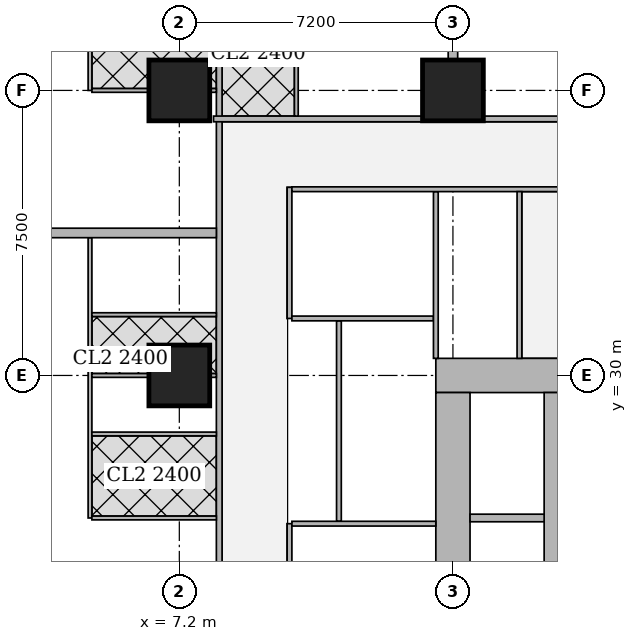
"""IFC4 building model, lengths in metres.
Left out: names, types, materials, properties, quantities, classifications, styles, units other than length and angle.
Written with IfcOpenShell. Run it as: python <this file> out.ifc"""

import sys

from ifc_helpers import new_model, si_unit, direction, frame, frame_2d, origin, origin_2d, place, context, subcontext, project, spatial, rectangle, extrude, element, fill, save


model = new_model("IFC4")
c1 = context("Model", 3, precision=1e-05, world=origin(), true_north=direction((0.0, 1.0)))
c2 = subcontext(c1, "Body", "Model", "MODEL_VIEW")
j1 = project(units=[si_unit("LENGTHUNIT", "METRE"), si_unit("PLANEANGLEUNIT", "RADIAN")], contexts=[c1])
p1 = place(None, origin())
s1 = spatial("IfcSite", under=j1, at=p1, CompositionType="ELEMENT")
p2 = place(p1, origin())
s2 = spatial("IfcBuilding", under=s1, at=p2, CompositionType="ELEMENT")
p3 = place(p2, frame((0.0, 0.0, 81.65)))
s3 = spatial("IfcBuildingStorey", under=s2, at=p3, CompositionType="ELEMENT", Elevation=81.65)
for number, where, z_axis, x_axis in (
    (1, (7.2, 30.0, 0.0), (0.0, 0.0, 1.0), (1.0, 0.0, 0.0)),
    (2, (7.2, 37.5, 0.0), (0.0, 0.0, 1.0), (1.0, 0.0, 0.0)),
    (3, (14.4, 37.5, 0.0), (0.0, 0.0, 1.0), (1.0, 0.0, 0.0)),
):
    element("IfcColumn", number, at=place(p3, frame(where, z_axis=z_axis, x_axis=x_axis)), inside=s3, PredefinedType="COLUMN", context=c2, shape_type="SweptSolid", body=[
        extrude(rectangle(XDim=1.6, YDim=1.6, at=origin_2d()), origin(), (0.0, 0.0, 1.0), 3.75),
    ])
p4 = place(p3, frame((13.95, 30.0, 0.0), z_axis=(0.0, 0.0, 1.0), x_axis=(1.0, 0.0, 0.0)))
e4 = element("IfcWall", 4, at=p4, inside=s3, PredefinedType="SHEAR", context=c2, shape_type="SweptSolid", body=[
    extrude(rectangle(XDim=15.3, YDim=0.9, at=frame_2d((7.65, 0.0))), origin(), (0.0, 0.0, 1.0), 3.75),
])
p5 = place(p4, frame((4.45, 0.0, 0.0)))
e5 = element("IfcOpeningElement", 5, at=p5, cuts=e4, PredefinedType="OPENING", context=c2, shape_type="SweptSolid", body=[
    extrude(rectangle(XDim=1.8, YDim=2.1, at=frame_2d((0.9, 1.05))), frame((0.0, 0.46, 0.0), z_axis=(0.0, -1.0, 0.0), x_axis=(1.0, 0.0, 0.0)), (0.0, 0.0, 1.0), 0.92),
])
p6 = place(p4, frame((10.7, 0.0, 0.0)))
e6 = element("IfcOpeningElement", 6, at=p6, cuts=e4, PredefinedType="OPENING", context=c2, shape_type="SweptSolid", body=[
    extrude(rectangle(XDim=1.1, YDim=2.1, at=frame_2d((0.55, 1.05))), frame((0.0, 0.46, 0.0), z_axis=(0.0, -1.0, 0.0), x_axis=(1.0, 0.0, 0.0)), (0.0, 0.0, 1.0), 0.92),
])
p7 = place(p3, frame((14.4, 15.45, 0.0), z_axis=(0.0, 0.0, 1.0), x_axis=(0.0, 1.0, 0.0)))
e7 = element("IfcWall", 7, at=p7, inside=s3, PredefinedType="SHEAR", context=c2, shape_type="SweptSolid", body=[
    extrude(rectangle(XDim=14.1, YDim=0.9, at=frame_2d((7.05, 0.0))), origin(), (0.0, 0.0, 1.0), 3.75),
])
p8 = place(p3, frame((17.0, 15.45, 0.0), z_axis=(0.0, 0.0, 1.0), x_axis=(0.0, 1.0, 0.0)))
e8 = element("IfcWall", 8, at=p8, inside=s3, PredefinedType="SHEAR", context=c2, shape_type="SweptSolid", body=[
    extrude(rectangle(XDim=14.1, YDim=0.4, at=frame_2d((7.05, 0.0))), origin(), (0.0, 0.0, 1.0), 3.75),
])
p9 = place(p8, frame((0.875, 0.0, 0.0)))
e9 = element("IfcOpeningElement", 9, at=p9, cuts=e8, PredefinedType="OPENING", context=c2, shape_type="SweptSolid", body=[
    extrude(rectangle(XDim=1.1, YDim=2.1, at=frame_2d((0.55, 1.05))), frame((0.0, 0.21, 0.0), z_axis=(0.0, -1.0, 0.0), x_axis=(1.0, 0.0, 0.0)), (0.0, 0.0, 1.0), 0.42),
])
p10 = place(p8, frame((4.625, 0.0, 0.0)))
e10 = element("IfcOpeningElement", 10, at=p10, cuts=e8, PredefinedType="OPENING", context=c2, shape_type="SweptSolid", body=[
    extrude(rectangle(XDim=1.1, YDim=2.1, at=frame_2d((0.55, 1.05))), frame((0.0, 0.21, 0.0), z_axis=(0.0, -1.0, 0.0), x_axis=(1.0, 0.0, 0.0)), (0.0, 0.0, 1.0), 0.42),
])
p11 = place(p8, frame((8.375, 0.0, 0.0)))
e11 = element("IfcOpeningElement", 11, at=p11, cuts=e8, PredefinedType="OPENING", context=c2, shape_type="SweptSolid", body=[
    extrude(rectangle(XDim=1.1, YDim=2.1, at=frame_2d((0.55, 1.05))), frame((0.0, 0.21, 0.0), z_axis=(0.0, -1.0, 0.0), x_axis=(1.0, 0.0, 0.0)), (0.0, 0.0, 1.0), 0.42),
])
p12 = place(p8, frame((12.125, 0.0, 0.0)))
e12 = element("IfcOpeningElement", 12, at=p12, cuts=e8, PredefinedType="OPENING", context=c2, shape_type="SweptSolid", body=[
    extrude(rectangle(XDim=1.1, YDim=2.1, at=frame_2d((0.55, 1.05))), frame((0.0, 0.21, 0.0), z_axis=(0.0, -1.0, 0.0), x_axis=(1.0, 0.0, 0.0)), (0.0, 0.0, 1.0), 0.42),
])
p13 = place(p3, frame((8.25, 2.126, 0.0), z_axis=(0.0, 0.0, 1.0), x_axis=(0.0, 1.0, 0.0)))
e13 = element("IfcWall", 13, at=p13, inside=s3, PredefinedType="SOLIDWALL", context=c2, shape_type="SweptSolid", body=[
    extrude(rectangle(XDim=40.773, YDim=0.15, at=frame_2d((20.386, 0.0))), origin(), (0.0, 0.0, 1.0), 3.5),
])
p14 = place(p13, frame((17.787, 0.0, 0.0)))
e14 = element("IfcOpeningElement", 14, at=p14, cuts=e13, PredefinedType="OPENING", context=c2, shape_type="SweptSolid", body=[
    extrude(rectangle(XDim=1.0, YDim=2.1, at=frame_2d((0.5, 1.05))), frame((0.0, 0.085, 0.0), z_axis=(0.0, -1.0, 0.0), x_axis=(1.0, 0.0, 0.0)), (0.0, 0.0, 1.0), 0.17),
])
p15 = place(p13, frame((21.962, 0.0, 0.0)))
e15 = element("IfcOpeningElement", 15, at=p15, cuts=e13, PredefinedType="OPENING", context=c2, shape_type="SweptSolid", body=[
    extrude(rectangle(XDim=1.0, YDim=2.1, at=frame_2d((0.5, 1.05))), frame((0.0, 0.085, 0.0), z_axis=(0.0, -1.0, 0.0), x_axis=(1.0, 0.0, 0.0)), (0.0, 0.0, 1.0), 0.17),
])
p16 = place(p13, frame((32.787, 0.0, 0.0)))
e16 = element("IfcOpeningElement", 16, at=p16, cuts=e13, PredefinedType="OPENING", context=c2, shape_type="SweptSolid", body=[
    extrude(rectangle(XDim=1.0, YDim=2.1, at=frame_2d((0.5, 1.05))), frame((0.0, 0.085, 0.0), z_axis=(0.0, -1.0, 0.0), x_axis=(1.0, 0.0, 0.0)), (0.0, 0.0, 1.0), 0.17),
])
p17 = place(p3, frame((8.1, 36.75, 0.0), z_axis=(0.0, 0.0, 1.0), x_axis=(1.0, 0.0, 0.0)))
e17 = element("IfcWall", 17, at=p17, inside=s3, PredefinedType="SOLIDWALL", context=c2, shape_type="SweptSolid", body=[
    extrude(rectangle(XDim=5.499, YDim=0.15, at=frame_2d((2.75, 0.0))), origin(), (0.0, 0.0, 1.0), 3.5),
])
p18 = place(p17, frame((3.739, 0.0, 0.0)))
e18 = element("IfcOpeningElement", 18, at=p18, cuts=e17, PredefinedType="OPENING", context=c2, shape_type="SweptSolid", body=[
    extrude(rectangle(XDim=1.0, YDim=2.1, at=frame_2d((0.5, 1.05))), frame((0.0, 0.085, 0.0), z_axis=(0.0, -1.0, 0.0), x_axis=(1.0, 0.0, 0.0)), (0.0, 0.0, 1.0), 0.17),
])
p19 = place(p3, frame((15.201, 36.75, 0.0), z_axis=(0.0, 0.0, 1.0), x_axis=(1.0, 0.0, 0.0)))
e19 = element("IfcWall", 19, at=p19, inside=s3, PredefinedType="SOLIDWALL", context=c2, shape_type="SweptSolid", body=[
    extrude(rectangle(XDim=5.598, YDim=0.15, at=frame_2d((2.799, 0.0))), origin(), (0.0, 0.0, 1.0), 3.5),
])
p20 = place(p19, frame((0.699, 0.0, 0.0)))
e20 = element("IfcOpeningElement", 20, at=p20, cuts=e19, PredefinedType="OPENING", context=c2, shape_type="SweptSolid", body=[
    extrude(rectangle(XDim=1.0, YDim=2.1, at=frame_2d((0.5, 1.05))), frame((0.0, 0.085, 0.0), z_axis=(0.0, -1.0, 0.0), x_axis=(1.0, 0.0, 0.0)), (0.0, 0.0, 1.0), 0.17),
])
p21 = place(p3, frame((4.85, 26.25, 0.0), z_axis=(0.0, 0.0, 1.0), x_axis=(0.0, 1.0, 0.0)))
e21 = element("IfcWall", 21, at=p21, inside=s3, PredefinedType="PARTITIONING", context=c2, shape_type="SweptSolid", body=[
    extrude(rectangle(XDim=7.375, YDim=0.1, at=frame_2d((3.688, 0.0))), origin(), (0.0, 0.0, 1.0), 3.5),
])
p22 = place(p21, frame((0.655, 0.0, 0.0)))
e22 = element("IfcOpeningElement", 22, at=p22, cuts=e21, PredefinedType="OPENING", context=c2, shape_type="SweptSolid", body=[
    extrude(rectangle(XDim=0.9, YDim=2.1, at=frame_2d((0.45, 1.05))), frame((0.0, 0.06, 0.0), z_axis=(0.0, -1.0, 0.0), x_axis=(1.0, 0.0, 0.0)), (0.0, 0.0, 1.0), 0.12),
])
p23 = place(p21, frame((4.1, 0.0, 0.0)))
e23 = element("IfcOpeningElement", 23, at=p23, cuts=e21, PredefinedType="OPENING", context=c2, shape_type="SweptSolid", body=[
    extrude(rectangle(XDim=0.9, YDim=2.1, at=frame_2d((0.45, 1.05))), frame((0.0, 0.06, 0.0), z_axis=(0.0, -1.0, 0.0), x_axis=(1.0, 0.0, 0.0)), (0.0, 0.0, 1.0), 0.12),
])
p24 = place(p21, frame((2.53, 0.0, 0.0)))
e24 = element("IfcOpeningElement", 24, at=p24, cuts=e21, PredefinedType="OPENING", context=c2, shape_type="SweptSolid", body=[
    extrude(rectangle(XDim=0.9, YDim=2.1, at=frame_2d((0.45, 1.05))), frame((0.0, 0.06, 0.0), z_axis=(0.0, -1.0, 0.0), x_axis=(1.0, 0.0, 0.0)), (0.0, 0.0, 1.0), 0.12),
])
p25 = place(p21, frame((5.975, 0.0, 0.0)))
e25 = element("IfcOpeningElement", 25, at=p25, cuts=e21, PredefinedType="OPENING", context=c2, shape_type="SweptSolid", body=[
    extrude(rectangle(XDim=0.9, YDim=2.1, at=frame_2d((0.45, 1.05))), frame((0.0, 0.06, 0.0), z_axis=(0.0, -1.0, 0.0), x_axis=(1.0, 0.0, 0.0)), (0.0, 0.0, 1.0), 0.12),
])
p26 = place(p3, frame((4.9, 26.25, 0.0), z_axis=(0.0, 0.0, 1.0), x_axis=(1.0, 0.0, 0.0)))
e26 = element("IfcWall", 26, at=p26, inside=s3, PredefinedType="PARTITIONING", context=c2, shape_type="SweptSolid", body=[
    extrude(rectangle(XDim=3.275, YDim=0.1, at=frame_2d((1.638, 0.0))), origin(), (0.0, 0.0, 1.0), 3.5),
])
p27 = place(p3, frame((4.9, 30.0, 0.0), z_axis=(0.0, 0.0, 1.0), x_axis=(1.0, 0.0, 0.0)))
e27 = element("IfcWall", 27, at=p27, inside=s3, PredefinedType="PARTITIONING", context=c2, shape_type="SweptSolid", body=[
    extrude(rectangle(XDim=1.499, YDim=0.1, at=frame_2d((0.75, 0.0))), origin(), (0.0, 0.0, 1.0), 3.5),
])
p28 = place(p3, frame((8.001, 30.0, 0.0), z_axis=(0.0, 0.0, 1.0), x_axis=(1.0, 0.0, 0.0)))
e28 = element("IfcWall", 28, at=p28, inside=s3, PredefinedType="PARTITIONING", context=c2, shape_type="SweptSolid", body=[
    extrude(rectangle(XDim=0.174, YDim=0.1, at=frame_2d((0.087, 0.0))), origin(), (0.0, 0.0, 1.0), 3.5),
])
for number, where, z_axis, x_axis in (
    (29, (4.9, 28.46, 0.0), (0.0, 0.0, 1.0), (1.0, 0.0, 0.0)),
    (30, (4.9, 31.6, 0.0), (0.0, 0.0, 1.0), (1.0, 0.0, 0.0)),
):
    element("IfcWall", number, at=place(p3, frame(where, z_axis=z_axis, x_axis=x_axis)), inside=s3, PredefinedType="PARTITIONING", context=c2, shape_type="SweptSolid", body=[
        extrude(rectangle(XDim=3.275, YDim=0.1, at=frame_2d((1.638, 0.0))), origin(), (0.0, 0.0, 1.0), 3.5),
    ])
p29 = place(p3, frame((4.85, 37.5, 0.0), z_axis=(0.0, 0.0, 1.0), x_axis=(0.0, 1.0, 0.0)))
e31 = element("IfcWall", 31, at=p29, inside=s3, PredefinedType="PARTITIONING", context=c2, shape_type="SweptSolid", body=[
    extrude(rectangle(XDim=4.699, YDim=0.1, at=frame_2d((2.35, 0.0))), origin(), (0.0, 0.0, 1.0), 3.5),
])
p30 = place(p29, frame((0.655, 0.0, 0.0)))
e32 = element("IfcOpeningElement", 32, at=p30, cuts=e31, PredefinedType="OPENING", context=c2, shape_type="SweptSolid", body=[
    extrude(rectangle(XDim=0.9, YDim=2.1, at=frame_2d((0.45, 1.05))), frame((0.0, 0.06, 0.0), z_axis=(0.0, -1.0, 0.0), x_axis=(1.0, 0.0, 0.0)), (0.0, 0.0, 1.0), 0.12),
])
p31 = place(p29, frame((2.53, 0.0, 0.0)))
e33 = element("IfcOpeningElement", 33, at=p31, cuts=e31, PredefinedType="OPENING", context=c2, shape_type="SweptSolid", body=[
    extrude(rectangle(XDim=0.9, YDim=2.1, at=frame_2d((0.45, 1.05))), frame((0.0, 0.06, 0.0), z_axis=(0.0, -1.0, 0.0), x_axis=(1.0, 0.0, 0.0)), (0.0, 0.0, 1.0), 0.12),
])
p32 = place(p3, frame((4.9, 37.5, 0.0), z_axis=(0.0, 0.0, 1.0), x_axis=(1.0, 0.0, 0.0)))
e34 = element("IfcWall", 34, at=p32, inside=s3, PredefinedType="PARTITIONING", context=c2, shape_type="SweptSolid", body=[
    extrude(rectangle(XDim=1.499, YDim=0.1, at=frame_2d((0.75, 0.0))), origin(), (0.0, 0.0, 1.0), 3.5),
])
p33 = place(p3, frame((8.001, 37.5, 0.0), z_axis=(0.0, 0.0, 1.0), x_axis=(1.0, 0.0, 0.0)))
e35 = element("IfcWall", 35, at=p33, inside=s3, PredefinedType="PARTITIONING", context=c2, shape_type="SweptSolid", body=[
    extrude(rectangle(XDim=0.174, YDim=0.1, at=frame_2d((0.087, 0.0))), origin(), (0.0, 0.0, 1.0), 3.5),
])
p34 = place(p3, frame((3.65, 33.75, 0.0), z_axis=(0.0, 0.0, 1.0), x_axis=(1.0, 0.0, 0.0)))
e36 = element("IfcWall", 36, at=p34, inside=s3, PredefinedType="SOLIDWALL", context=c2, shape_type="SweptSolid", body=[
    extrude(rectangle(XDim=4.525, YDim=0.25, at=frame_2d((2.263, 0.0))), origin(), (0.0, 0.0, 1.0), 3.5),
])
p35 = place(p3, frame((10.279, 36.825, 0.0), z_axis=(0.0, 0.0, 1.0), x_axis=(0.0, 1.0, 0.0)))
e37 = element("IfcWall", 37, at=p35, inside=s3, PredefinedType="PARTITIONING", context=c2, shape_type="SweptSolid", body=[
    extrude(rectangle(XDim=3.275, YDim=0.1, at=frame_2d((1.638, 0.0))), origin(), (0.0, 0.0, 1.0), 3.5),
])
p36 = place(p3, frame((14.4, 38.301, 0.0), z_axis=(0.0, 0.0, 1.0), x_axis=(0.0, 1.0, 0.0)))
e38 = element("IfcWall", 38, at=p36, inside=s3, PredefinedType="SOLIDWALL", context=c2, shape_type="SweptSolid", body=[
    extrude(rectangle(XDim=3.049, YDim=0.25, at=frame_2d((1.524, 0.0))), origin(), (0.0, 0.0, 1.0), 3.5),
])
p37 = place(p3, frame((10.1, 10.05, 0.0), z_axis=(0.0, 0.0, 1.0), x_axis=(0.0, 1.0, 0.0)))
e39 = element("IfcWall", 39, at=p37, inside=s3, PredefinedType="PARTITIONING", context=c2, shape_type="SweptSolid", body=[
    extrude(rectangle(XDim=16.05, YDim=0.125, at=frame_2d((8.025, 0.0))), origin(), (0.0, 0.0, 1.0), 3.5),
])
p38 = place(p37, frame((1.675, 0.0, 0.0)))
e40 = element("IfcOpeningElement", 40, at=p38, cuts=e39, PredefinedType="OPENING", context=c2, shape_type="SweptSolid", body=[
    extrude(rectangle(XDim=1.0, YDim=2.1, at=frame_2d((0.5, 1.05))), frame((0.0, 0.073, 0.0), z_axis=(0.0, -1.0, 0.0), x_axis=(1.0, 0.0, 0.0)), (0.0, 0.0, 1.0), 0.145),
])
p39 = place(p37, frame((5.95, 0.0, 0.0)))
e41 = element("IfcOpeningElement", 41, at=p39, cuts=e39, PredefinedType="OPENING", context=c2, shape_type="SweptSolid", body=[
    extrude(rectangle(XDim=1.0, YDim=2.1, at=frame_2d((0.5, 1.05))), frame((0.0, 0.073, 0.0), z_axis=(0.0, -1.0, 0.0), x_axis=(1.0, 0.0, 0.0)), (0.0, 0.0, 1.0), 0.145),
])
p40 = place(p37, frame((11.8, 0.0, 0.0)))
e42 = element("IfcOpeningElement", 42, at=p40, cuts=e39, PredefinedType="OPENING", context=c2, shape_type="SweptSolid", body=[
    extrude(rectangle(XDim=1.0, YDim=2.1, at=frame_2d((0.5, 1.05))), frame((0.0, 0.073, 0.0), z_axis=(0.0, -1.0, 0.0), x_axis=(1.0, 0.0, 0.0)), (0.0, 0.0, 1.0), 0.145),
])
p41 = place(p3, frame((10.1, 31.5, 0.0), z_axis=(0.0, 0.0, 1.0), x_axis=(0.0, 1.0, 0.0)))
e43 = element("IfcWall", 43, at=p41, inside=s3, PredefinedType="PARTITIONING", context=c2, shape_type="SweptSolid", body=[
    extrude(rectangle(XDim=3.45, YDim=0.125, at=frame_2d((1.725, 0.0))), origin(), (0.0, 0.0, 1.0), 3.5),
])
p42 = place(p41, frame((1.225, 0.0, 0.0)))
e44 = element("IfcOpeningElement", 44, at=p42, cuts=e43, PredefinedType="OPENING", context=c2, shape_type="SweptSolid", body=[
    extrude(rectangle(XDim=1.0, YDim=2.1, at=frame_2d((0.5, 1.05))), frame((0.0, 0.073, 0.0), z_axis=(0.0, -1.0, 0.0), x_axis=(1.0, 0.0, 0.0)), (0.0, 0.0, 1.0), 0.145),
])
p43 = place(p3, frame((11.4, 26.163, 0.0), z_axis=(0.0, 0.0, 1.0), x_axis=(0.0, 1.0, 0.0)))
e45 = element("IfcWall", 45, at=p43, inside=s3, PredefinedType="PARTITIONING", context=c2, shape_type="SweptSolid", body=[
    extrude(rectangle(XDim=5.275, YDim=0.125, at=frame_2d((2.637, 0.0))), origin(), (0.0, 0.0, 1.0), 3.5),
])
p44 = place(p43, frame((2.137, 0.0, 0.0)))
e46 = element("IfcOpeningElement", 46, at=p44, cuts=e45, PredefinedType="OPENING", context=c2, shape_type="SweptSolid", body=[
    extrude(rectangle(XDim=1.0, YDim=2.1, at=frame_2d((0.5, 1.05))), frame((0.0, 0.073, 0.0), z_axis=(0.0, -1.0, 0.0), x_axis=(1.0, 0.0, 0.0)), (0.0, 0.0, 1.0), 0.145),
])
p45 = place(p3, frame((10.163, 26.1, 0.0), z_axis=(0.0, 0.0, 1.0), x_axis=(1.0, 0.0, 0.0)))
e47 = element("IfcWall", 47, at=p45, inside=s3, PredefinedType="PARTITIONING", context=c2, shape_type="SweptSolid", body=[
    extrude(rectangle(XDim=3.787, YDim=0.125, at=frame_2d((1.894, 0.0))), origin(), (0.0, 0.0, 1.0), 3.5),
])
p46 = place(p3, frame((10.163, 31.5, 0.0), z_axis=(0.0, 0.0, 1.0), x_axis=(1.0, 0.0, 0.0)))
e48 = element("IfcWall", 48, at=p46, inside=s3, PredefinedType="PARTITIONING", context=c2, shape_type="SweptSolid", body=[
    extrude(rectangle(XDim=3.725, YDim=0.125, at=frame_2d((1.862, 0.0))), origin(), (0.0, 0.0, 1.0), 3.5),
])
p47 = place(p3, frame((13.95, 30.45, 0.0), z_axis=(0.0, 0.0, 1.0), x_axis=(0.0, 1.0, 0.0)))
e49 = element("IfcWall", 49, at=p47, inside=s3, PredefinedType="PARTITIONING", context=c2, shape_type="SweptSolid", body=[
    extrude(rectangle(XDim=4.387, YDim=0.125, at=frame_2d((2.193, 0.0))), origin(), (0.0, 0.0, 1.0), 3.5),
])
p48 = place(p3, frame((10.163, 34.9, 0.0), z_axis=(0.0, 0.0, 1.0), x_axis=(1.0, 0.0, 0.0)))
e50 = element("IfcWall", 50, at=p48, inside=s3, PredefinedType="PARTITIONING", context=c2, shape_type="SweptSolid", body=[
    extrude(rectangle(XDim=11.287, YDim=0.125, at=frame_2d((5.644, 0.0))), origin(), (0.0, 0.0, 1.0), 3.5),
])
p49 = place(p48, frame((7.737, 0.0, 0.0)))
e51 = element("IfcOpeningElement", 51, at=p49, cuts=e50, PredefinedType="OPENING", context=c2, shape_type="SweptSolid", body=[
    extrude(rectangle(XDim=1.8, YDim=2.1, at=frame_2d((0.9, 1.05))), frame((0.0, 0.073, 0.0), z_axis=(0.0, -1.0, 0.0), x_axis=(1.0, 0.0, 0.0)), (0.0, 0.0, 1.0), 0.145),
])
p50 = place(p3, frame((16.15, 30.45, 0.0), z_axis=(0.0, 0.0, 1.0), x_axis=(0.0, 1.0, 0.0)))
e52 = element("IfcWall", 52, at=p50, inside=s3, PredefinedType="PARTITIONING", context=c2, shape_type="SweptSolid", body=[
    extrude(rectangle(XDim=4.387, YDim=0.125, at=frame_2d((2.193, 0.0))), origin(), (0.0, 0.0, 1.0), 3.5),
])
p51 = place(p50, frame((1.75, 0.0, 0.0)))
e53 = element("IfcOpeningElement", 53, at=p51, cuts=e52, PredefinedType="OPENING", context=c2, shape_type="SweptSolid", body=[
    extrude(rectangle(XDim=1.0, YDim=2.1, at=frame_2d((0.5, 1.05))), frame((0.0, 0.073, 0.0), z_axis=(0.0, -1.0, 0.0), x_axis=(1.0, 0.0, 0.0)), (0.0, 0.0, 1.0), 0.145),
])
p52 = place(p3, frame((14.85, 26.25, 0.0), z_axis=(0.0, 0.0, 1.0), x_axis=(1.0, 0.0, 0.0)))
e54 = element("IfcWall", 54, at=p52, inside=s3, PredefinedType="SOLIDWALL", context=c2, shape_type="SweptSolid", body=[
    extrude(rectangle(XDim=1.95, YDim=0.2, at=frame_2d((0.975, 0.0))), origin(), (0.0, 0.0, 1.0), 3.5),
])
p53 = place(p22, origin())
e55 = element("IfcDoor", 55, at=p53, inside=s3, OperationType="SINGLE_SWING_RIGHT", PredefinedType="DOOR", context=c2, shape_type="SweptSolid", body=[
    extrude(rectangle(XDim=0.9, YDim=2.1, at=frame_2d((0.45, 1.05))), frame((0.0, 0.025, 0.0), z_axis=(0.0, -1.0, 0.0), x_axis=(1.0, 0.0, 0.0)), (0.0, 0.0, 1.0), 0.05),
])
fill(e22, e55)
p54 = place(p23, origin())
e56 = element("IfcDoor", 56, at=p54, inside=s3, OperationType="SINGLE_SWING_RIGHT", PredefinedType="DOOR", context=c2, shape_type="SweptSolid", body=[
    extrude(rectangle(XDim=0.9, YDim=2.1, at=frame_2d((0.45, 1.05))), frame((0.0, 0.025, 0.0), z_axis=(0.0, -1.0, 0.0), x_axis=(1.0, 0.0, 0.0)), (0.0, 0.0, 1.0), 0.05),
])
fill(e23, e56)
p55 = place(p24, origin())
e57 = element("IfcDoor", 57, at=p55, inside=s3, OperationType="SINGLE_SWING_RIGHT", PredefinedType="DOOR", context=c2, shape_type="SweptSolid", body=[
    extrude(rectangle(XDim=0.9, YDim=2.1, at=frame_2d((0.45, 1.05))), frame((0.0, 0.025, 0.0), z_axis=(0.0, -1.0, 0.0), x_axis=(1.0, 0.0, 0.0)), (0.0, 0.0, 1.0), 0.05),
])
fill(e24, e57)
p56 = place(p25, origin())
e58 = element("IfcDoor", 58, at=p56, inside=s3, OperationType="SINGLE_SWING_LEFT", PredefinedType="DOOR", context=c2, shape_type="SweptSolid", body=[
    extrude(rectangle(XDim=0.9, YDim=2.1, at=frame_2d((0.45, 1.05))), frame((0.0, 0.025, 0.0), z_axis=(0.0, -1.0, 0.0), x_axis=(1.0, 0.0, 0.0)), (0.0, 0.0, 1.0), 0.05),
])
fill(e25, e58)
p57 = place(p30, origin())
e59 = element("IfcDoor", 59, at=p57, inside=s3, OperationType="SINGLE_SWING_RIGHT", PredefinedType="DOOR", context=c2, shape_type="SweptSolid", body=[
    extrude(rectangle(XDim=0.9, YDim=2.1, at=frame_2d((0.45, 1.05))), frame((0.0, 0.025, 0.0), z_axis=(0.0, -1.0, 0.0), x_axis=(1.0, 0.0, 0.0)), (0.0, 0.0, 1.0), 0.05),
])
fill(e32, e59)
p58 = place(p16, origin())
e60 = element("IfcDoor", 60, at=p58, inside=s3, OperationType="SINGLE_SWING_LEFT", PredefinedType="DOOR", context=c2, shape_type="SweptSolid", body=[
    extrude(rectangle(XDim=1.0, YDim=2.1, at=frame_2d((0.5, 1.05))), frame((0.0, 0.025, 0.0), z_axis=(0.0, -1.0, 0.0), x_axis=(1.0, 0.0, 0.0)), (0.0, 0.0, 1.0), 0.05),
])
fill(e16, e60)
p59 = place(p18, origin())
e61 = element("IfcDoor", 61, at=p59, inside=s3, OperationType="SINGLE_SWING_RIGHT", PredefinedType="DOOR", context=c2, shape_type="SweptSolid", body=[
    extrude(rectangle(XDim=1.0, YDim=2.1, at=frame_2d((0.5, 1.05))), frame((0.0, 0.025, 0.0), z_axis=(0.0, -1.0, 0.0), x_axis=(1.0, 0.0, 0.0)), (0.0, 0.0, 1.0), 0.05),
])
fill(e18, e61)
p60 = place(p20, origin())
e62 = element("IfcDoor", 62, at=p60, inside=s3, OperationType="SINGLE_SWING_LEFT", PredefinedType="DOOR", context=c2, shape_type="SweptSolid", body=[
    extrude(rectangle(XDim=1.0, YDim=2.1, at=frame_2d((0.5, 1.05))), frame((0.0, 0.025, 0.0), z_axis=(0.0, -1.0, 0.0), x_axis=(1.0, 0.0, 0.0)), (0.0, 0.0, 1.0), 0.05),
])
fill(e20, e62)
p61 = place(p44, origin())
e63 = element("IfcDoor", 63, at=p61, inside=s3, OperationType="SINGLE_SWING_RIGHT", PredefinedType="DOOR", context=c2, shape_type="SweptSolid", body=[
    extrude(rectangle(XDim=1.0, YDim=2.1, at=frame_2d((0.5, 1.05))), frame((0.0, 0.025, 0.0), z_axis=(0.0, -1.0, 0.0), x_axis=(1.0, 0.0, 0.0)), (0.0, 0.0, 1.0), 0.05),
])
fill(e46, e63)
p62 = place(p42, origin())
e64 = element("IfcDoor", 64, at=p62, inside=s3, OperationType="SINGLE_SWING_LEFT", PredefinedType="DOOR", context=c2, shape_type="SweptSolid", body=[
    extrude(rectangle(XDim=1.0, YDim=2.1, at=frame_2d((0.5, 1.05))), frame((0.0, 0.025, 0.0), z_axis=(0.0, -1.0, 0.0), x_axis=(1.0, 0.0, 0.0)), (0.0, 0.0, 1.0), 0.05),
])
fill(e44, e64)
p63 = place(p51, origin())
e65 = element("IfcDoor", 65, at=p63, inside=s3, OperationType="SINGLE_SWING_RIGHT", PredefinedType="DOOR", context=c2, shape_type="SweptSolid", body=[
    extrude(rectangle(XDim=1.0, YDim=2.1, at=frame_2d((0.5, 1.05))), frame((0.0, 0.025, 0.0), z_axis=(0.0, -1.0, 0.0), x_axis=(1.0, 0.0, 0.0)), (0.0, 0.0, 1.0), 0.05),
])
fill(e53, e65)
p64 = place(p12, origin())
e66 = element("IfcDoor", 66, at=p64, inside=s3, OperationType="DOUBLE_DOOR_SLIDING", PredefinedType="DOOR", context=c2, shape_type="SweptSolid", body=[
    extrude(rectangle(XDim=1.1, YDim=2.1, at=frame_2d((0.55, 1.05))), frame((0.0, 0.025, 0.0), z_axis=(0.0, -1.0, 0.0), x_axis=(1.0, 0.0, 0.0)), (0.0, 0.0, 1.0), 0.05),
])
fill(e12, e66)
save(model, sys.argv[1])
